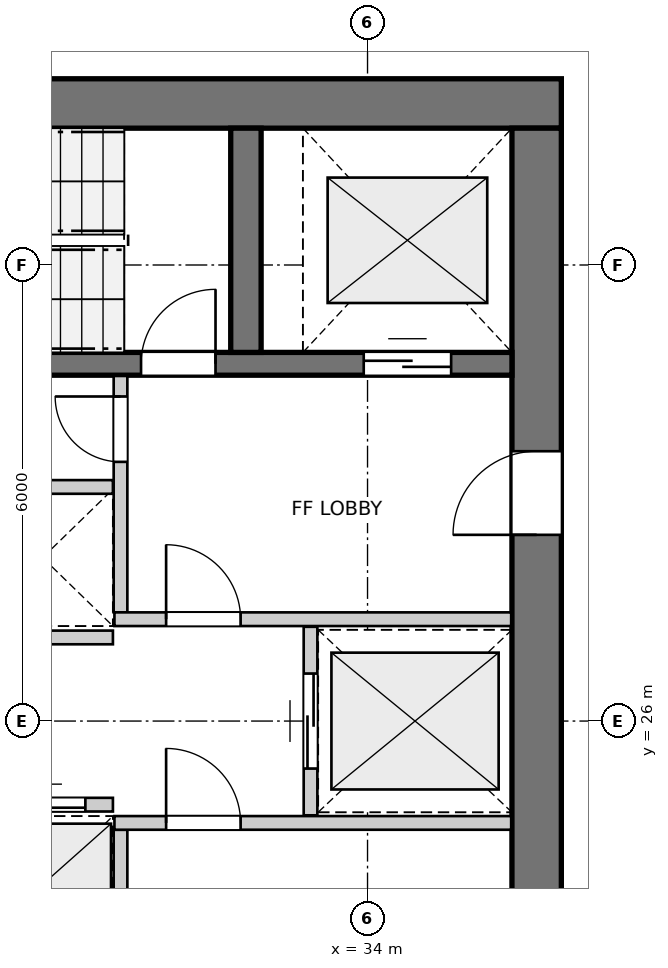
"""IFC4 building model, lengths in metres.
Left out: names, types, materials, properties, quantities, classifications, styles, units other than length and angle.
Written with IfcOpenShell. Run it as: python <this file> out.ifc"""

import sys

from ifc_helpers import new_model, si_unit, direction, frame, frame_2d, origin, place, context, subcontext, project, spatial, rectangle, extrude, source, transform, mapped, element, fill, save


model = new_model("IFC4")
c1 = context("Model", 3, precision=1e-05, world=origin(), true_north=direction((0.0, 1.0)))
c2 = subcontext(c1, "Body", "Model", "MODEL_VIEW")
j1 = project(units=[si_unit("LENGTHUNIT", "METRE"), si_unit("PLANEANGLEUNIT", "RADIAN")], contexts=[c1])
p1 = place(None, origin())
s1 = spatial("IfcSite", under=j1, at=p1, CompositionType="ELEMENT")
p2 = place(p1, origin())
s2 = spatial("IfcBuilding", under=s1, at=p2, CompositionType="ELEMENT")
p3 = place(p2, frame((0.0, 0.0, 118.4)))
s3 = spatial("IfcBuildingStorey", under=s2, at=p3, CompositionType="ELEMENT", Elevation=118.4)
p4 = place(p3, frame((36.55, 34.125, 0.0), z_axis=(0.0, 0.0, 1.0), x_axis=(-1.0, 0.0, 0.0)))
e1 = element("IfcWall", 1, at=p4, inside=s3, PredefinedType="SHEAR", context=c2, shape_type="SweptSolid", body=[
    extrude(rectangle(XDim=12.4, YDim=0.65, at=frame_2d((6.2, 0.0))), origin(), (0.0, 0.0, 1.0), 2.95),
])
p5 = place(p3, frame((36.225, 18.2, 0.0), z_axis=(0.0, 0.0, 1.0), x_axis=(0.0, 1.0, 0.0)))
e2 = element("IfcWall", 2, at=p5, inside=s3, PredefinedType="SHEAR", context=c2, shape_type="SweptSolid", body=[
    extrude(rectangle(XDim=15.6, YDim=0.65, at=frame_2d((7.8, 0.0))), origin(), (0.0, 0.0, 1.0), 2.95),
])
p6 = place(p5, frame((4.25, 0.0, 0.0)))
e3 = element("IfcOpeningElement", 3, at=p6, cuts=e2, PredefinedType="OPENING", context=c2, shape_type="SweptSolid", body=[
    extrude(rectangle(XDim=1.1, YDim=2.15, at=frame_2d((0.55, 1.075))), frame((0.0, 0.335, 0.0), z_axis=(0.0, -1.0, 0.0), x_axis=(1.0, 0.0, 0.0)), (0.0, 0.0, 1.0), 0.67),
])
p7 = place(p5, frame((10.25, 0.0, 0.0)))
e4 = element("IfcOpeningElement", 4, at=p7, cuts=e2, PredefinedType="OPENING", context=c2, shape_type="SweptSolid", body=[
    extrude(rectangle(XDim=1.1, YDim=2.15, at=frame_2d((0.55, 1.075))), frame((0.0, 0.335, 0.0), z_axis=(0.0, -1.0, 0.0), x_axis=(1.0, 0.0, 0.0)), (0.0, 0.0, 1.0), 0.67),
])
p8 = place(p3, frame((24.8, 30.7, 0.0), z_axis=(0.0, 0.0, 1.0), x_axis=(1.0, 0.0, 0.0)))
e5 = element("IfcWall", 5, at=p8, inside=s3, PredefinedType="SHEAR", context=c2, shape_type="SweptSolid", body=[
    extrude(rectangle(XDim=11.1, YDim=0.3, at=frame_2d((5.55, 0.0))), origin(), (0.0, 0.0, 1.0), 2.95),
])
p9 = place(p8, frame((6.22, 0.0, 0.0)))
e6 = element("IfcOpeningElement", 6, at=p9, cuts=e5, PredefinedType="OPENING", context=c2, shape_type="SweptSolid", body=[
    extrude(rectangle(XDim=0.98, YDim=2.15, at=frame_2d((0.49, 1.075))), frame((0.0, 0.16, 0.0), z_axis=(0.0, -1.0, 0.0), x_axis=(1.0, 0.0, 0.0)), (0.0, 0.0, 1.0), 0.32),
])
p10 = place(p8, frame((9.15, 0.0, 0.0)))
e7 = element("IfcOpeningElement", 7, at=p10, cuts=e5, PredefinedType="OPENING", context=c2, shape_type="SweptSolid", body=[
    extrude(rectangle(XDim=1.15, YDim=2.15, at=frame_2d((0.575, 1.075))), frame((0.0, 0.16, 0.0), z_axis=(0.0, -1.0, 0.0), x_axis=(1.0, 0.0, 0.0)), (0.0, 0.0, 1.0), 0.32),
])
p11 = place(p3, frame((32.4, 30.85, 0.0), z_axis=(0.0, 0.0, 1.0), x_axis=(0.0, 1.0, 0.0)))
e8 = element("IfcWall", 8, at=p11, inside=s3, PredefinedType="SHEAR", context=c2, shape_type="SweptSolid", body=[
    extrude(rectangle(XDim=2.95, YDim=0.4, at=frame_2d((1.475, 0.0))), origin(), (0.0, 0.0, 1.0), 2.95),
])
p12 = place(p3, frame((30.75, 21.46, 0.0), z_axis=(0.0, 0.0, 1.0), x_axis=(0.0, 1.0, 0.0)))
e9 = element("IfcWall", 9, at=p12, inside=s3, PredefinedType="PARTITIONING", context=c2, shape_type="SweptSolid", body=[
    extrude(rectangle(XDim=3.11, YDim=0.18, at=frame_2d((1.555, 0.0))), origin(), (0.0, 0.0, 1.0), 2.95),
])
p13 = place(p12, frame((0.26, 0.0, 0.0)))
e10 = element("IfcOpeningElement", 10, at=p13, cuts=e9, PredefinedType="OPENING", context=c2, shape_type="SweptSolid", body=[
    extrude(rectangle(XDim=0.86, YDim=2.05, at=frame_2d((0.43, 1.025))), frame((0.0, 0.1, 0.0), z_axis=(0.0, -1.0, 0.0), x_axis=(1.0, 0.0, 0.0)), (0.0, 0.0, 1.0), 0.2),
])
p14 = place(p3, frame((30.67, 24.66, 0.0), z_axis=(0.0, 0.0, 1.0), x_axis=(1.0, 0.0, 0.0)))
e11 = element("IfcWall", 11, at=p14, inside=s3, PredefinedType="PARTITIONING", context=c2, shape_type="SweptSolid", body=[
    extrude(rectangle(XDim=5.22, YDim=0.18, at=frame_2d((2.61, 0.0))), origin(), (0.0, 0.0, 1.0), 2.95),
])
p15 = place(p14, frame((0.68, 0.0, 0.0)))
e12 = element("IfcOpeningElement", 12, at=p15, cuts=e11, PredefinedType="OPENING", context=c2, shape_type="SweptSolid", body=[
    extrude(rectangle(XDim=0.98, YDim=2.15, at=frame_2d((0.49, 1.075))), frame((0.0, 0.1, 0.0), z_axis=(0.0, -1.0, 0.0), x_axis=(1.0, 0.0, 0.0)), (0.0, 0.0, 1.0), 0.2),
])
p16 = place(p3, frame((30.75, 27.43, 0.0), z_axis=(0.0, 0.0, 1.0), x_axis=(0.0, 1.0, 0.0)))
e13 = element("IfcWall", 13, at=p16, inside=s3, PredefinedType="PARTITIONING", context=c2, shape_type="SweptSolid", body=[
    extrude(rectangle(XDim=3.11, YDim=0.18, at=frame_2d((1.555, 0.0))), origin(), (0.0, 0.0, 1.0), 2.95),
])
p17 = place(p16, frame((1.98, 0.0, 0.0)))
e14 = element("IfcOpeningElement", 14, at=p17, cuts=e13, PredefinedType="OPENING", context=c2, shape_type="SweptSolid", body=[
    extrude(rectangle(XDim=0.86, YDim=2.05, at=frame_2d((0.43, 1.025))), frame((0.0, 0.1, 0.0), z_axis=(0.0, -1.0, 0.0), x_axis=(1.0, 0.0, 0.0)), (0.0, 0.0, 1.0), 0.2),
])
p18 = place(p3, frame((30.67, 27.34, 0.0), z_axis=(0.0, 0.0, 1.0), x_axis=(1.0, 0.0, 0.0)))
e15 = element("IfcWall", 15, at=p18, inside=s3, PredefinedType="PARTITIONING", context=c2, shape_type="SweptSolid", body=[
    extrude(rectangle(XDim=5.22, YDim=0.18, at=frame_2d((2.61, 0.0))), origin(), (0.0, 0.0, 1.0), 2.95),
])
p19 = place(p18, frame((0.68, 0.0, 0.0)))
e16 = element("IfcOpeningElement", 16, at=p19, cuts=e15, PredefinedType="OPENING", context=c2, shape_type="SweptSolid", body=[
    extrude(rectangle(XDim=0.98, YDim=2.15, at=frame_2d((0.49, 1.075))), frame((0.0, 0.1, 0.0), z_axis=(0.0, -1.0, 0.0), x_axis=(1.0, 0.0, 0.0)), (0.0, 0.0, 1.0), 0.2),
])
p20 = place(p3, frame((33.25, 24.76, 0.0), z_axis=(0.0, 0.0, 1.0), x_axis=(0.0, 1.0, 0.0)))
e17 = element("IfcWall", 17, at=p20, inside=s3, PredefinedType="PARTITIONING", context=c2, shape_type="SweptSolid", body=[
    extrude(rectangle(XDim=2.48, YDim=0.18, at=frame_2d((1.24, 0.0))), origin(), (0.0, 0.0, 1.0), 2.95),
])
p21 = place(p20, frame((0.615, 0.0, 0.0)))
e18 = element("IfcOpeningElement", 18, at=p21, cuts=e17, PredefinedType="OPENING", context=c2, shape_type="SweptSolid", body=[
    extrude(rectangle(XDim=1.25, YDim=2.15, at=frame_2d((0.625, 1.075))), frame((0.0, 0.1, 0.0), z_axis=(0.0, -1.0, 0.0), x_axis=(1.0, 0.0, 0.0)), (0.0, 0.0, 1.0), 0.2),
])
p22 = place(p3, frame((28.825, 24.9, 0.0), z_axis=(0.0, 0.0, 1.0), x_axis=(1.0, 0.0, 0.0)))
e19 = element("IfcWall", 19, at=p22, inside=s3, PredefinedType="PARTITIONING", context=c2, shape_type="SweptSolid", body=[
    extrude(rectangle(XDim=1.825, YDim=0.18, at=frame_2d((0.913, 0.0))), origin(), (0.0, 0.0, 1.0), 2.95),
])
p23 = place(p22, frame((0.363, 0.0, 0.0)))
e20 = element("IfcOpeningElement", 20, at=p23, cuts=e19, PredefinedType="OPENING", context=c2, shape_type="SweptSolid", body=[
    extrude(rectangle(XDim=1.1, YDim=2.15, at=frame_2d((0.55, 1.075))), frame((0.0, 0.1, 0.0), z_axis=(0.0, -1.0, 0.0), x_axis=(1.0, 0.0, 0.0)), (0.0, 0.0, 1.0), 0.2),
])
p24 = place(p3, frame((24.81, 29.08, 0.0), z_axis=(0.0, 0.0, 1.0), x_axis=(1.0, 0.0, 0.0)))
e21 = element("IfcWall", 21, at=p24, inside=s3, PredefinedType="PARTITIONING", context=c2, shape_type="SweptSolid", body=[
    extrude(rectangle(XDim=5.84, YDim=0.18, at=frame_2d((2.92, 0.0))), origin(), (0.0, 0.0, 1.0), 2.95),
])
p25 = place(p3, frame((28.825, 27.1, 0.0), z_axis=(0.0, 0.0, 1.0), x_axis=(1.0, 0.0, 0.0)))
e22 = element("IfcWall", 22, at=p25, inside=s3, PredefinedType="PARTITIONING", context=c2, shape_type="SweptSolid", body=[
    extrude(rectangle(XDim=1.825, YDim=0.18, at=frame_2d((0.913, 0.0))), origin(), (0.0, 0.0, 1.0), 2.95),
])
m1 = source(origin(), c2, "Body", "SweptSolid", [
    extrude(rectangle(XDim=0.98, YDim=2.15, at=frame_2d((0.49, 1.075))), frame((0.0, 0.025, 0.0), z_axis=(0.0, -1.0, 0.0), x_axis=(1.0, 0.0, 0.0)), (0.0, 0.0, 1.0), 0.05),
])
p26 = place(p9, origin())
e23 = element("IfcDoor", 23, at=p26, inside=s3, OperationType="SINGLE_SWING_RIGHT", PredefinedType="DOOR", context=c2, shape_type="MappedRepresentation", body=[
    mapped(m1, transform((0.0, 0.0, 0.0), x_axis=(1.0, 0.0, 0.0), y_axis=(0.0, 1.0, 0.0), z_axis=(0.0, 0.0, 1.0), scale=1.0)),
])
fill(e6, e23)
m2 = source(origin(), c2, "Body", "SweptSolid", [
    extrude(rectangle(XDim=1.15, YDim=2.15, at=frame_2d((0.575, 1.075))), frame((0.0, 0.025, 0.0), z_axis=(0.0, -1.0, 0.0), x_axis=(1.0, 0.0, 0.0)), (0.0, 0.0, 1.0), 0.05),
])
p27 = place(p10, origin())
e24 = element("IfcDoor", 24, at=p27, inside=s3, OperationType="DOUBLE_DOOR_SLIDING", PredefinedType="DOOR", context=c2, shape_type="MappedRepresentation", body=[
    mapped(m2, transform((0.0, 0.0, 0.0), x_axis=(1.0, 0.0, 0.0), y_axis=(0.0, 1.0, 0.0), z_axis=(0.0, 0.0, 1.0), scale=1.0)),
])
fill(e7, e24)
m3 = source(origin(), c2, "Body", "SweptSolid", [
    extrude(rectangle(XDim=1.1, YDim=2.15, at=frame_2d((0.55, 1.075))), frame((0.0, 0.025, 0.0), z_axis=(0.0, -1.0, 0.0), x_axis=(1.0, 0.0, 0.0)), (0.0, 0.0, 1.0), 0.05),
])
p28 = place(p7, origin())
e25 = element("IfcDoor", 25, at=p28, inside=s3, OperationType="SINGLE_SWING_LEFT", PredefinedType="DOOR", context=c2, shape_type="MappedRepresentation", body=[
    mapped(m3, transform((0.0, 0.0, 0.0), x_axis=(1.0, 0.0, 0.0), y_axis=(0.0, 1.0, 0.0), z_axis=(0.0, 0.0, 1.0), scale=1.0)),
])
fill(e4, e25)
p29 = place(p15, origin())
e26 = element("IfcDoor", 26, at=p29, inside=s3, OperationType="SINGLE_SWING_LEFT", PredefinedType="DOOR", context=c2, shape_type="MappedRepresentation", body=[
    mapped(m1, transform((0.0, 0.0, 0.0), x_axis=(1.0, 0.0, 0.0), y_axis=(0.0, 1.0, 0.0), z_axis=(0.0, 0.0, 1.0), scale=1.0)),
])
fill(e12, e26)
m4 = source(origin(), c2, "Body", "SweptSolid", [
    extrude(rectangle(XDim=0.86, YDim=2.05, at=frame_2d((0.43, 1.025))), frame((0.0, 0.025, 0.0), z_axis=(0.0, -1.0, 0.0), x_axis=(1.0, 0.0, 0.0)), (0.0, 0.0, 1.0), 0.05),
])
p30 = place(p17, origin())
e27 = element("IfcDoor", 27, at=p30, inside=s3, OperationType="SINGLE_SWING_RIGHT", PredefinedType="DOOR", context=c2, shape_type="MappedRepresentation", body=[
    mapped(m4, transform((0.0, 0.0, 0.0), x_axis=(1.0, 0.0, 0.0), y_axis=(0.0, 1.0, 0.0), z_axis=(0.0, 0.0, 1.0), scale=1.0)),
])
fill(e14, e27)
p31 = place(p19, origin())
e28 = element("IfcDoor", 28, at=p31, inside=s3, OperationType="SINGLE_SWING_LEFT", PredefinedType="DOOR", context=c2, shape_type="MappedRepresentation", body=[
    mapped(m1, transform((0.0, 0.0, 0.0), x_axis=(1.0, 0.0, 0.0), y_axis=(0.0, 1.0, 0.0), z_axis=(0.0, 0.0, 1.0), scale=1.0)),
])
fill(e16, e28)
m5 = source(origin(), c2, "Body", "SweptSolid", [
    extrude(rectangle(XDim=1.25, YDim=2.15, at=frame_2d((0.625, 1.075))), frame((0.0, 0.025, 0.0), z_axis=(0.0, -1.0, 0.0), x_axis=(1.0, 0.0, 0.0)), (0.0, 0.0, 1.0), 0.05),
])
p32 = place(p21, origin())
e29 = element("IfcDoor", 29, at=p32, inside=s3, OperationType="DOUBLE_DOOR_SLIDING", PredefinedType="DOOR", context=c2, shape_type="MappedRepresentation", body=[
    mapped(m5, transform((0.0, 0.0, 0.0), x_axis=(1.0, 0.0, 0.0), y_axis=(0.0, 1.0, 0.0), z_axis=(0.0, 0.0, 1.0), scale=1.0)),
])
fill(e18, e29)
p33 = place(p23, origin())
e30 = element("IfcDoor", 30, at=p33, inside=s3, OperationType="DOUBLE_DOOR_SLIDING", PredefinedType="DOOR", context=c2, shape_type="MappedRepresentation", body=[
    mapped(m3, transform((0.0, 0.0, 0.0), x_axis=(1.0, 0.0, 0.0), y_axis=(0.0, 1.0, 0.0), z_axis=(0.0, 0.0, 1.0), scale=1.0)),
])
fill(e20, e30)
save(model, sys.argv[1])
